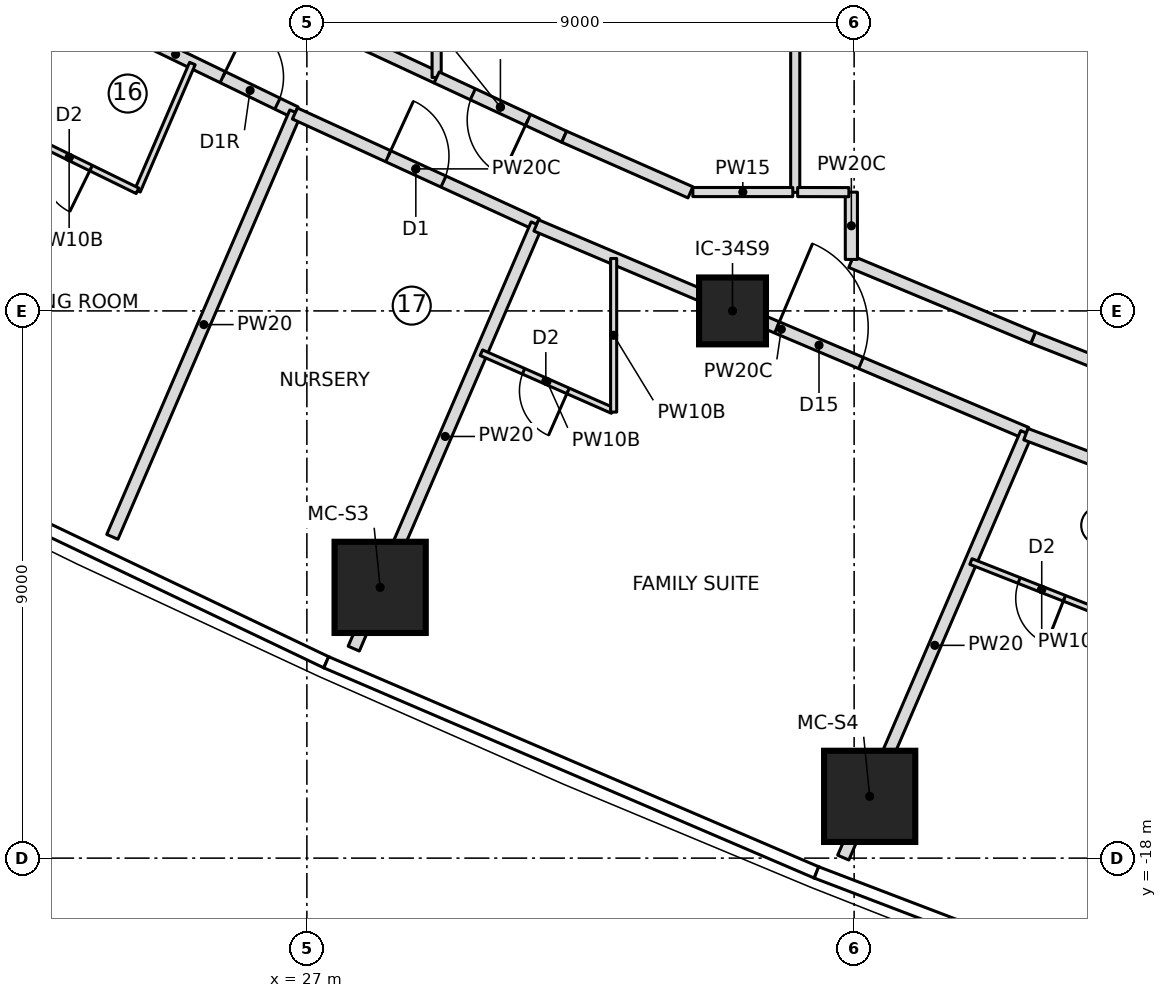
"""IFC4 building model, lengths in metres.
Left out: names, types, materials, properties, quantities, classifications, styles, units other than length and angle.
Written with IfcOpenShell. Run it as: python <this file> out.ifc"""

import sys

from ifc_helpers import new_model, si_unit, direction, frame, frame_2d, origin, origin_2d, place, context, subcontext, project, spatial, rectangle, extrude, element, fill, save


model = new_model("IFC4")
c1 = context("Model", 3, precision=1e-05, world=origin(), true_north=direction((0.0, 1.0)))
c2 = subcontext(c1, "Body", "Model", "MODEL_VIEW")
j1 = project(units=[si_unit("LENGTHUNIT", "METRE"), si_unit("PLANEANGLEUNIT", "RADIAN")], contexts=[c1])
p1 = place(None, origin())
s1 = spatial("IfcSite", under=j1, at=p1, CompositionType="ELEMENT")
p2 = place(p1, origin())
s2 = spatial("IfcBuilding", under=s1, at=p2, CompositionType="ELEMENT")
p3 = place(p2, frame((0.0, 0.0, 155.05)))
s3 = spatial("IfcBuildingStorey", under=s2, at=p3, CompositionType="ELEMENT", Elevation=155.05)
for number, where, z_axis, x_axis in (
    (1, (28.205, -13.547, 0.0), (0.0, 0.0, 1.0), (1.0, 0.0, 0.0)),
    (2, (36.256, -16.984, 0.0), (0.0, 0.0, 1.0), (1.0, 0.0, 0.0)),
):
    element("IfcColumn", number, at=place(p3, frame(where, z_axis=z_axis, x_axis=x_axis)), inside=s3, PredefinedType="COLUMN", context=c2, shape_type="SweptSolid", body=[
        extrude(rectangle(XDim=1.5, YDim=1.5, at=origin_2d()), origin(), (0.0, 0.0, 1.0), 3.55),
    ])
p4 = place(p3, frame((34.0, -9.0, 0.0), z_axis=(0.0, 0.0, 1.0), x_axis=(1.0, 0.0, 0.0)))
e3 = element("IfcColumn", 3, at=p4, inside=s3, PredefinedType="COLUMN", context=c2, shape_type="SweptSolid", body=[
    extrude(rectangle(XDim=1.1, YDim=1.1, at=origin_2d()), origin(), (0.0, 0.0, 1.0), 3.55),
])
p5 = place(p3, frame((19.865, -10.797, 0.0), z_axis=(0.0, 0.0, 1.0), x_axis=(0.395985583575, 0.918256727501, 0.0)))
e4 = element("IfcWall", 4, at=p5, inside=s3, PredefinedType="PARTITIONING", context=c2, shape_type="SweptSolid", body=[
    extrude(rectangle(XDim=7.611, YDim=0.2, at=frame_2d((3.806, 0.0))), origin(), (0.0, 0.0, 1.0), 3.25),
])
p6 = place(p3, frame((22.871, -3.826, 0.0), z_axis=(0.0, 0.0, 1.0), x_axis=(0.899988502444, -0.435913633038, 0.0)))
e5 = element("IfcWall", 5, at=p6, inside=s3, PredefinedType="PARTITIONING", context=c2, shape_type="SweptSolid", body=[
    extrude(rectangle(XDim=4.378, YDim=0.2, at=frame_2d((2.189, 0.0))), origin(), (0.0, 0.0, 1.0), 3.25),
])
p7 = place(p6, frame((3.05, 0.0, 0.0)))
e6 = element("IfcOpeningElement", 6, at=p7, cuts=e5, PredefinedType="OPENING", context=c2, shape_type="SweptSolid", body=[
    extrude(rectangle(XDim=1.0, YDim=2.1, at=frame_2d((0.5, 1.05))), frame((0.0, 0.11, 0.0), z_axis=(0.0, -1.0, 0.0), x_axis=(1.0, 0.0, 0.0)), (0.0, 0.0, 1.0), 0.22),
])
p8 = place(p3, frame((25.117, -4.932, 0.0), z_axis=(0.0, 0.0, 1.0), x_axis=(-0.396037997114, -0.918234123109, 0.0)))
e7 = element("IfcWall", 7, at=p8, inside=s3, PredefinedType="PARTITIONING", context=c2, shape_type="SweptSolid", body=[
    extrude(rectangle(XDim=2.28, YDim=0.1, at=frame_2d((1.14, 0.0))), origin(), (0.0, 0.0, 1.0), 3.25),
])
p9 = place(p3, frame((24.214, -7.025, 0.0), z_axis=(0.0, 0.0, 1.0), x_axis=(-0.898122466967, 0.439745419907, 0.0)))
e8 = element("IfcWall", 8, at=p9, inside=s3, PredefinedType="PARTITIONING", context=c2, shape_type="SweptSolid", body=[
    extrude(rectangle(XDim=2.503, YDim=0.1, at=frame_2d((1.251, 0.0))), origin(), (0.0, 0.0, 1.0), 3.25),
])
p10 = place(p9, frame((0.85, 0.0, 0.0)))
e9 = element("IfcOpeningElement", 9, at=p10, cuts=e8, PredefinedType="OPENING", context=c2, shape_type="SweptSolid", body=[
    extrude(rectangle(XDim=0.8, YDim=2.1, at=frame_2d((0.4, 1.05))), frame((0.0, 0.06, 0.0), z_axis=(0.0, -1.0, 0.0), x_axis=(1.0, 0.0, 0.0)), (0.0, 0.0, 1.0), 0.12),
])
p11 = place(p3, frame((23.801, -12.716, 0.0), z_axis=(0.0, 0.0, 1.0), x_axis=(0.395995556294, 0.918252426839, 0.0)))
e10 = element("IfcWall", 10, at=p11, inside=s3, PredefinedType="PARTITIONING", context=c2, shape_type="SweptSolid", body=[
    extrude(rectangle(XDim=7.603, YDim=0.2, at=frame_2d((3.802, 0.0))), origin(), (0.0, 0.0, 1.0), 3.25),
])
p12 = place(p3, frame((26.803, -5.753, 0.0), z_axis=(0.0, 0.0, 1.0), x_axis=(0.90910092787, -0.416575926987, 0.0)))
e11 = element("IfcWall", 11, at=p12, inside=s3, PredefinedType="PARTITIONING", context=c2, shape_type="SweptSolid", body=[
    extrude(rectangle(XDim=4.375, YDim=0.2, at=frame_2d((2.188, 0.0))), origin(), (0.0, 0.0, 1.0), 3.25),
])
p13 = place(p12, frame((1.688, 0.0, 0.0)))
e12 = element("IfcOpeningElement", 12, at=p13, cuts=e11, PredefinedType="OPENING", context=c2, shape_type="SweptSolid", body=[
    extrude(rectangle(XDim=1.0, YDim=2.1, at=frame_2d((0.5, 1.05))), frame((0.0, 0.11, 0.0), z_axis=(0.0, -1.0, 0.0), x_axis=(1.0, 0.0, 0.0)), (0.0, 0.0, 1.0), 0.22),
])
p14 = place(p3, frame((27.771, -14.554, 0.0), z_axis=(0.0, 0.0, 1.0), x_axis=(0.396004020147, 0.918248776763, 0.0)))
e13 = element("IfcWall", 13, at=p14, inside=s3, PredefinedType="PARTITIONING", context=c2, shape_type="SweptSolid", body=[
    extrude(rectangle(XDim=7.6, YDim=0.2, at=frame_2d((3.8, 0.0))), origin(), (0.0, 0.0, 1.0), 3.25),
])
p15 = place(p3, frame((30.772, -7.594, 0.0), z_axis=(0.0, 0.0, 1.0), x_axis=(0.920747305421, -0.390159454019, 0.0)))
e14 = element("IfcWall", 14, at=p15, inside=s3, PredefinedType="PARTITIONING", context=c2, shape_type="SweptSolid", body=[
    extrude(rectangle(XDim=8.754, YDim=0.2, at=frame_2d((4.377, 0.0))), origin(), (0.0, 0.0, 1.0), 3.25),
])
p16 = place(p15, frame((4.3, 0.0, 0.0)))
e15 = element("IfcOpeningElement", 15, at=p16, cuts=e14, PredefinedType="OPENING", context=c2, shape_type="SweptSolid", body=[
    extrude(rectangle(XDim=1.5, YDim=2.1, at=frame_2d((0.75, 1.05))), frame((0.0, 0.11, 0.0), z_axis=(0.0, -1.0, 0.0), x_axis=(1.0, 0.0, 0.0)), (0.0, 0.0, 1.0), 0.22),
])
p17 = place(p3, frame((32.028, -10.638, 0.0), z_axis=(0.0, 0.0, 1.0), x_axis=(-0.915108845766, 0.403206895278, 0.0)))
e16 = element("IfcWall", 16, at=p17, inside=s3, PredefinedType="PARTITIONING", context=c2, shape_type="SweptSolid", body=[
    extrude(rectangle(XDim=2.358, YDim=0.1, at=frame_2d((1.179, 0.0))), origin(), (0.0, 0.0, 1.0), 3.25),
])
p18 = place(p17, frame((0.8, 0.0, 0.0)))
e17 = element("IfcOpeningElement", 17, at=p18, cuts=e16, PredefinedType="OPENING", context=c2, shape_type="SweptSolid", body=[
    extrude(rectangle(XDim=0.8, YDim=2.1, at=frame_2d((0.4, 1.05))), frame((0.0, 0.06, 0.0), z_axis=(0.0, -1.0, 0.0), x_axis=(1.0, 0.0, 0.0)), (0.0, 0.0, 1.0), 0.12),
])
p19 = place(p3, frame((35.821, -17.991, 0.0), z_axis=(0.0, 0.0, 1.0), x_axis=(0.395987603644, 0.918255856371, 0.0)))
e18 = element("IfcWall", 18, at=p19, inside=s3, PredefinedType="PARTITIONING", context=c2, shape_type="SweptSolid", body=[
    extrude(rectangle(XDim=7.604, YDim=0.2, at=frame_2d((3.802, 0.0))), origin(), (0.0, 0.0, 1.0), 3.25),
])
p20 = place(p3, frame((38.824, -11.028, 0.0), z_axis=(0.0, 0.0, 1.0), x_axis=(0.936174374451, -0.351535973439, 0.0)))
e19 = element("IfcWall", 19, at=p20, inside=s3, PredefinedType="PARTITIONING", context=c2, shape_type="SweptSolid", body=[
    extrude(rectangle(XDim=8.755, YDim=0.2, at=frame_2d((4.377, 0.0))), origin(), (0.0, 0.0, 1.0), 3.25),
])
p21 = place(p20, frame((3.05, 0.0, 0.0)))
e20 = element("IfcOpeningElement", 20, at=p21, cuts=e19, PredefinedType="OPENING", context=c2, shape_type="SweptSolid", body=[
    extrude(rectangle(XDim=1.5, YDim=2.1, at=frame_2d((0.75, 1.05))), frame((0.0, 0.11, 0.0), z_axis=(0.0, -1.0, 0.0), x_axis=(1.0, 0.0, 0.0)), (0.0, 0.0, 1.0), 0.22),
])
p22 = place(p3, frame((40.249, -14.038, 0.0), z_axis=(0.0, 0.0, 1.0), x_axis=(-0.930555592459, 0.366150637503, 0.0)))
e21 = element("IfcWall", 21, at=p22, inside=s3, PredefinedType="PARTITIONING", context=c2, shape_type="SweptSolid", body=[
    extrude(rectangle(XDim=2.501, YDim=0.1, at=frame_2d((1.25, 0.0))), origin(), (0.0, 0.0, 1.0), 3.25),
])
p23 = place(p22, frame((0.85, 0.0, 0.0)))
e22 = element("IfcOpeningElement", 22, at=p23, cuts=e21, PredefinedType="OPENING", context=c2, shape_type="SweptSolid", body=[
    extrude(rectangle(XDim=0.8, YDim=2.1, at=frame_2d((0.4, 1.05))), frame((0.0, 0.06, 0.0), z_axis=(0.0, -1.0, 0.0), x_axis=(1.0, 0.0, 0.0)), (0.0, 0.0, 1.0), 0.12),
])
p24 = place(p3, frame((29.134, -5.16, 0.0), z_axis=(0.0, 0.0, 1.0), x_axis=(-0.906847924868, 0.421457994541, 0.0)))
e23 = element("IfcWall", 23, at=p24, inside=s3, PredefinedType="PARTITIONING", context=c2, shape_type="SweptSolid", body=[
    extrude(rectangle(XDim=1.883, YDim=0.2, at=frame_2d((0.941, 0.0))), origin(), (0.0, 0.0, 1.0), 3.25),
])
p25 = place(p3, frame((29.134, -5.16, 0.0), z_axis=(0.0, 0.0, 1.0), x_axis=(0.0, 1.0, 0.0)))
e24 = element("IfcWall", 24, at=p25, inside=s3, PredefinedType="PARTITIONING", context=c2, shape_type="SweptSolid", body=[
    extrude(rectangle(XDim=10.32, YDim=0.15, at=frame_2d((5.16, 0.0))), origin(), (0.0, 0.0, 1.0), 3.25),
])
p26 = place(p3, frame((31.231, -6.135, 0.0), z_axis=(0.0, 0.0, 1.0), x_axis=(-0.906815906336, 0.421526881723, 0.0)))
e25 = element("IfcWall", 25, at=p26, inside=s3, PredefinedType="PARTITIONING", context=c2, shape_type="SweptSolid", body=[
    extrude(rectangle(XDim=2.313, YDim=0.2, at=frame_2d((1.156, 0.0))), origin(), (0.0, 0.0, 1.0), 3.25),
])
p27 = place(p26, frame((0.656, 0.0, 0.0)))
e26 = element("IfcOpeningElement", 26, at=p27, cuts=e25, PredefinedType="OPENING", context=c2, shape_type="SweptSolid", body=[
    extrude(rectangle(XDim=1.0, YDim=2.1, at=frame_2d((0.5, 1.05))), frame((0.0, 0.11, 0.0), z_axis=(0.0, -1.0, 0.0), x_axis=(1.0, 0.0, 0.0)), (0.0, 0.0, 1.0), 0.22),
])
p28 = place(p3, frame((33.308, -7.05, 0.0), z_axis=(0.0, 0.0, 1.0), x_axis=(-0.915102334452, 0.403221672881, 0.0)))
e27 = element("IfcWall", 27, at=p28, inside=s3, PredefinedType="PARTITIONING", context=c2, shape_type="SweptSolid", body=[
    extrude(rectangle(XDim=2.269, YDim=0.2, at=frame_2d((1.135, 0.0))), origin(), (0.0, 0.0, 1.0), 3.25),
])
p29 = place(p3, frame((35.031, -7.05, 0.0), z_axis=(0.0, 0.0, 1.0), x_axis=(0.0, 1.0, 0.0)))
e28 = element("IfcWall", 28, at=p29, inside=s3, PredefinedType="PARTITIONING", context=c2, shape_type="SweptSolid", body=[
    extrude(rectangle(XDim=14.1, YDim=0.15, at=frame_2d((7.05, 0.0))), origin(), (0.0, 0.0, 1.0), 3.25),
])
p30 = place(p3, frame((42.847, -10.977, 0.0), z_axis=(0.0, 0.0, 1.0), x_axis=(-0.930576677263, 0.36609704688, 0.0)))
e29 = element("IfcWall", 29, at=p30, inside=s3, PredefinedType="PARTITIONING", context=c2, shape_type="SweptSolid", body=[
    extrude(rectangle(XDim=4.195, YDim=0.2, at=frame_2d((2.098, 0.0))), origin(), (0.0, 0.0, 1.0), 3.25),
])
p31 = place(p30, frame((1.598, 0.0, 0.0)))
e30 = element("IfcOpeningElement", 30, at=p31, cuts=e29, PredefinedType="OPENING", context=c2, shape_type="SweptSolid", body=[
    extrude(rectangle(XDim=1.0, YDim=2.1, at=frame_2d((0.5, 1.05))), frame((0.0, 0.11, 0.0), z_axis=(0.0, -1.0, 0.0), x_axis=(1.0, 0.0, 0.0)), (0.0, 0.0, 1.0), 0.22),
])
p32 = place(p3, frame((38.943, -9.441, 0.0), z_axis=(0.0, 0.0, 1.0), x_axis=(-0.923005630596, 0.384786441923, 0.0)))
e31 = element("IfcWall", 31, at=p32, inside=s3, PredefinedType="PARTITIONING", context=c2, shape_type="SweptSolid", body=[
    extrude(rectangle(XDim=3.243, YDim=0.2, at=frame_2d((1.622, 0.0))), origin(), (0.0, 0.0, 1.0), 3.25),
])
p33 = place(p3, frame((32.045, -8.138, 0.0), z_axis=(0.0, 0.0, 1.0), x_axis=(0.0, -1.0, 0.0)))
e32 = element("IfcWall", 32, at=p33, inside=s3, PredefinedType="PARTITIONING", context=c2, shape_type="SweptSolid", body=[
    extrude(rectangle(XDim=2.526, YDim=0.1, at=frame_2d((1.263, 0.0))), origin(), (0.0, 0.0, 1.0), 3.25),
])
p34 = place(p3, frame((34.991, -7.045, 0.0), z_axis=(0.0, 0.0, 1.0), x_axis=(-1.0, 0.0, 0.0)))
e33 = element("IfcWall", 33, at=p34, inside=s3, PredefinedType="PARTITIONING", context=c2, shape_type="SweptSolid", body=[
    extrude(rectangle(XDim=1.644, YDim=0.15, at=frame_2d((0.822, 0.0))), origin(), (0.0, 0.0, 1.0), 3.25),
])
p35 = place(p3, frame((35.955, -8.154, 0.0), z_axis=(0.0, 0.0, 1.0), x_axis=(-0.00110302161, 0.999999391671, 0.0)))
e34 = element("IfcWall", 34, at=p35, inside=s3, PredefinedType="PARTITIONING", context=c2, shape_type="SweptSolid", body=[
    extrude(rectangle(XDim=1.107, YDim=0.2, at=frame_2d((0.553, 0.0))), origin(), (0.0, 0.0, 1.0), 3.25),
])
p36 = place(p3, frame((35.914, -7.047, 0.0), z_axis=(0.0, 0.0, 1.0), x_axis=(-0.999998488592, 0.001738623857, 0.0)))
e35 = element("IfcWall", 35, at=p36, inside=s3, PredefinedType="PARTITIONING", context=c2, shape_type="SweptSolid", body=[
    extrude(rectangle(XDim=0.843, YDim=0.15, at=frame_2d((0.421, 0.0))), origin(), (0.0, 0.0, 1.0), 3.25),
])
p37 = place(p10, origin())
e36 = element("IfcDoor", 36, at=p37, inside=s3, OperationType="SINGLE_SWING_LEFT", PredefinedType="DOOR", context=c2, shape_type="SweptSolid", body=[
    extrude(rectangle(XDim=0.8, YDim=2.1, at=frame_2d((0.4, 1.05))), frame((0.0, 0.025, 0.0), z_axis=(0.0, -1.0, 0.0), x_axis=(1.0, 0.0, 0.0)), (0.0, 0.0, 1.0), 0.05),
])
fill(e9, e36)
p38 = place(p7, origin())
e37 = element("IfcDoor", 37, at=p38, inside=s3, OperationType="SINGLE_SWING_RIGHT", PredefinedType="DOOR", context=c2, shape_type="SweptSolid", body=[
    extrude(rectangle(XDim=1.0, YDim=2.1, at=frame_2d((0.5, 1.05))), frame((0.0, 0.025, 0.0), z_axis=(0.0, -1.0, 0.0), x_axis=(1.0, 0.0, 0.0)), (0.0, 0.0, 1.0), 0.05),
])
fill(e6, e37)
p39 = place(p13, origin())
e38 = element("IfcDoor", 38, at=p39, inside=s3, OperationType="SINGLE_SWING_LEFT", PredefinedType="DOOR", context=c2, shape_type="SweptSolid", body=[
    extrude(rectangle(XDim=1.0, YDim=2.1, at=frame_2d((0.5, 1.05))), frame((0.0, 0.025, 0.0), z_axis=(0.0, -1.0, 0.0), x_axis=(1.0, 0.0, 0.0)), (0.0, 0.0, 1.0), 0.05),
])
fill(e12, e38)
p40 = place(p18, origin())
e39 = element("IfcDoor", 39, at=p40, inside=s3, OperationType="SINGLE_SWING_LEFT", PredefinedType="DOOR", context=c2, shape_type="SweptSolid", body=[
    extrude(rectangle(XDim=0.8, YDim=2.1, at=frame_2d((0.4, 1.05))), frame((0.0, 0.025, 0.0), z_axis=(0.0, -1.0, 0.0), x_axis=(1.0, 0.0, 0.0)), (0.0, 0.0, 1.0), 0.05),
])
fill(e17, e39)
p41 = place(p16, origin())
e40 = element("IfcDoor", 40, at=p41, inside=s3, OperationType="DOUBLE_DOOR_SINGLE_SWING", PredefinedType="DOOR", context=c2, shape_type="SweptSolid", body=[
    extrude(rectangle(XDim=1.5, YDim=2.1, at=frame_2d((0.75, 1.05))), frame((0.0, 0.025, 0.0), z_axis=(0.0, -1.0, 0.0), x_axis=(1.0, 0.0, 0.0)), (0.0, 0.0, 1.0), 0.05),
])
fill(e15, e40)
p42 = place(p23, origin())
e41 = element("IfcDoor", 41, at=p42, inside=s3, OperationType="SINGLE_SWING_LEFT", PredefinedType="DOOR", context=c2, shape_type="SweptSolid", body=[
    extrude(rectangle(XDim=0.8, YDim=2.1, at=frame_2d((0.4, 1.05))), frame((0.0, 0.025, 0.0), z_axis=(0.0, -1.0, 0.0), x_axis=(1.0, 0.0, 0.0)), (0.0, 0.0, 1.0), 0.05),
])
fill(e22, e41)
p43 = place(p27, origin())
e42 = element("IfcDoor", 42, at=p43, inside=s3, OperationType="SINGLE_SWING_RIGHT", PredefinedType="DOOR", context=c2, shape_type="SweptSolid", body=[
    extrude(rectangle(XDim=1.0, YDim=2.1, at=frame_2d((0.5, 1.05))), frame((0.0, 0.025, 0.0), z_axis=(0.0, -1.0, 0.0), x_axis=(1.0, 0.0, 0.0)), (0.0, 0.0, 1.0), 0.05),
])
fill(e26, e42)
save(model, sys.argv[1])
